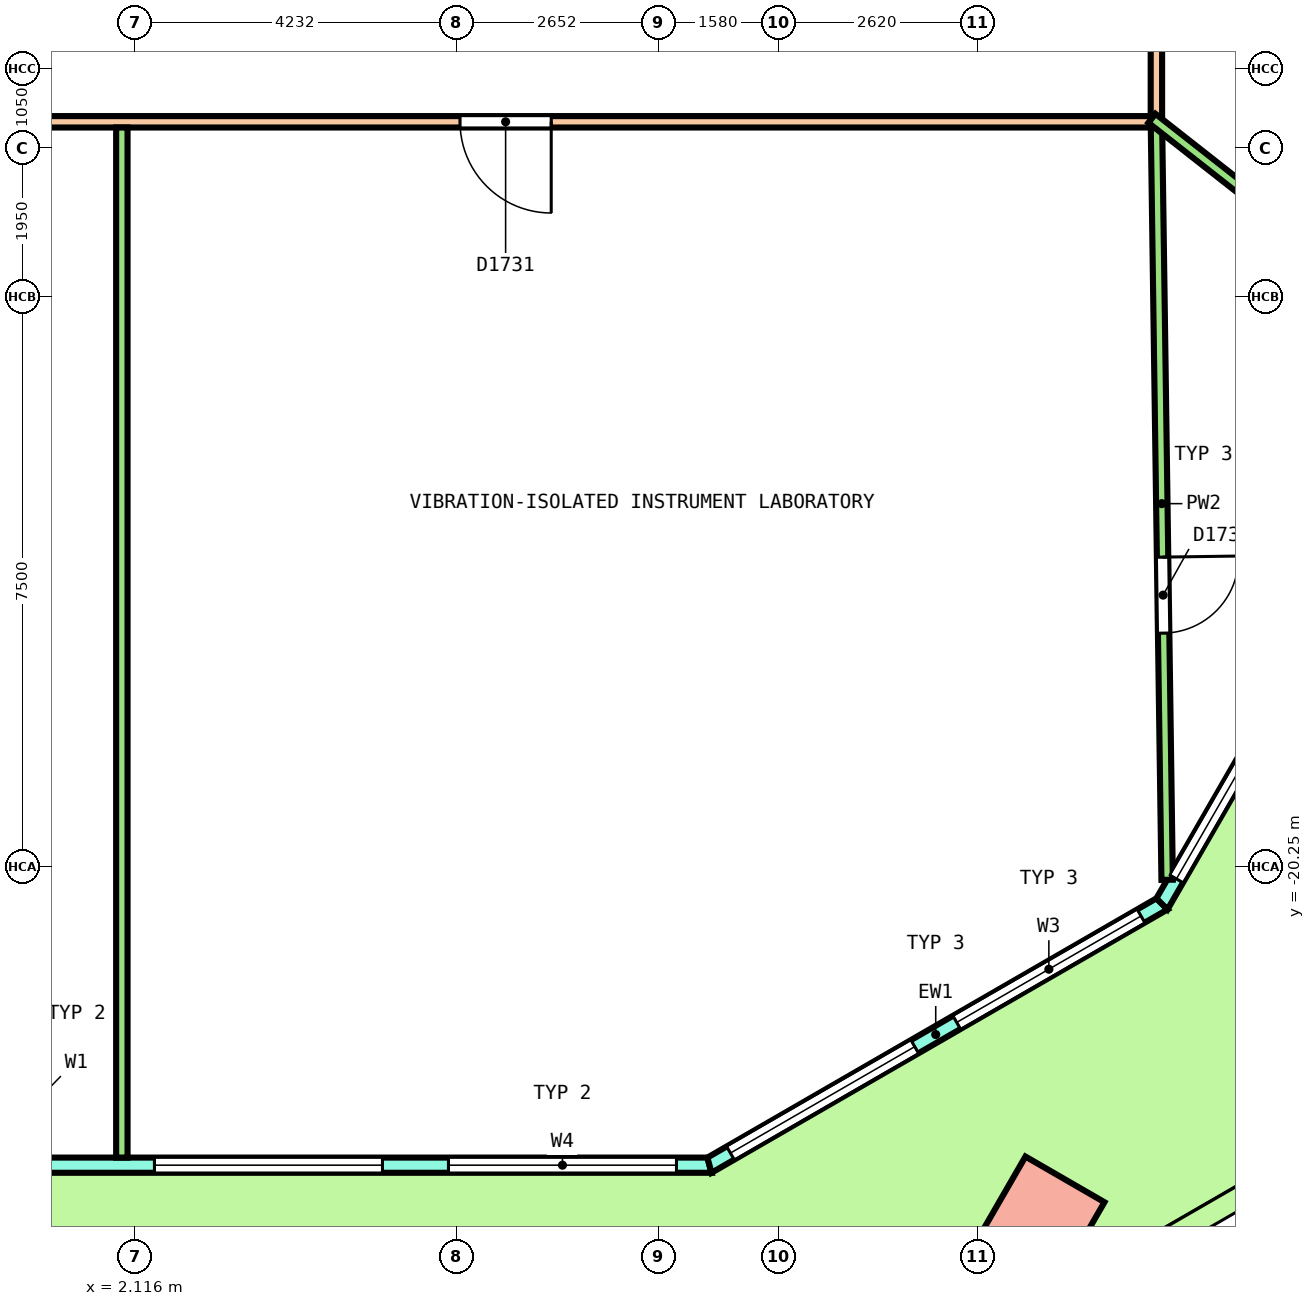
"""IFC4 building model, lengths in metres.
Left out: names, types, materials, properties, quantities, classifications, styles, units other than length and angle.
Written with IfcOpenShell. Run it as: python <this file> out.ifc"""

import sys

from ifc_helpers import new_model, si_unit, direction, frame, frame_2d, origin, origin_2d, place, context, subcontext, project, spatial, polyline, rectangle, outline, extrude, element, fill, save


model = new_model("IFC4")
c1 = context("Model", 3, precision=1e-05, world=origin(), true_north=direction((0.0, 1.0)))
c2 = subcontext(c1, "Body", "Model", "MODEL_VIEW")
j1 = project(units=[si_unit("LENGTHUNIT", "METRE"), si_unit("PLANEANGLEUNIT", "RADIAN")], contexts=[c1])
p1 = place(None, origin())
s1 = spatial("IfcSite", under=j1, at=p1, CompositionType="ELEMENT")
p2 = place(p1, origin())
s2 = spatial("IfcBuilding", under=s1, at=p2, CompositionType="ELEMENT")
p3 = place(p2, frame((0.0, 0.0, 154.0)))
s3 = spatial("IfcBuildingStorey", under=s2, at=p3, CompositionType="ELEMENT", Elevation=154.0)
p4 = place(p3, frame((14.047, -24.883, 0.0), z_axis=(-0.018132630042, -0.031385715123, 0.999342856388), x_axis=(0.865999247617, 0.499059286831, 0.031386802217)))
e1 = element("IfcColumn", 1, at=p4, inside=s3, PredefinedType="COLUMN", context=c2, shape_type="SweptSolid", body=[
    extrude(rectangle(XDim=1.2, YDim=1.2, at=origin_2d()), origin(), (0.0, 0.0, 1.0), 4.053),
])
p5 = place(p3, frame((-9.67, -24.177, 0.0), z_axis=(0.0, 0.0, 1.0), x_axis=(1.0, 0.0, 0.0)))
e2 = element("IfcWall", 2, at=p5, inside=s3, PredefinedType="SOLIDWALL", context=c2, shape_type="SweptSolid", body=[
    extrude(outline(polyline([(-0.027, -0.1), (0.994, -0.1), (2.015, -0.1), (3.035, -0.1), (4.056, -0.1), (5.077, -0.1), (6.097, -0.1), (7.118, -0.1), (8.139, -0.1), (9.16, -0.1), (10.18, -0.1), (11.201, -0.1), (12.222, -0.1), (13.242, -0.1), (14.263, -0.1), (15.284, -0.1), (16.304, -0.1), (17.325, -0.1), (18.346, -0.1), (19.367, -0.1), (19.313, 0.1), (18.298, 0.1), (17.283, 0.1), (16.268, 0.1), (15.253, 0.1), (14.238, 0.1), (13.223, 0.1), (12.208, 0.1), (11.193, 0.1), (10.177, 0.1), (9.162, 0.1), (8.147, 0.1), (7.132, 0.1), (6.117, 0.1), (5.102, 0.1), (4.087, 0.1), (3.072, 0.1), (2.057, 0.1), (1.042, 0.1), (0.027, 0.1), (-0.027, -0.1)])), origin(), (0.0, 0.0, 1.0), 4.1),
])
p6 = place(p5, frame((0.434, 0.0, 0.1)))
e3 = element("IfcOpeningElement", 3, at=p6, cuts=e2, PredefinedType="OPENING", context=c2, shape_type="SweptSolid", body=[
    extrude(rectangle(XDim=3.0, YDim=2.9, at=frame_2d((1.5, 1.45))), frame((0.0, 0.11, 0.0), z_axis=(0.0, -1.0, 0.0), x_axis=(1.0, 0.0, 0.0)), (0.0, 0.0, 1.0), 0.22),
])
p7 = place(p5, frame((4.302, 0.0, 0.1)))
e4 = element("IfcOpeningElement", 4, at=p7, cuts=e2, PredefinedType="OPENING", context=c2, shape_type="SweptSolid", body=[
    extrude(rectangle(XDim=3.0, YDim=2.9, at=frame_2d((1.5, 1.45))), frame((0.0, 0.11, 0.0), z_axis=(0.0, -1.0, 0.0), x_axis=(1.0, 0.0, 0.0)), (0.0, 0.0, 1.0), 0.22),
])
p8 = place(p5, frame((8.77, 0.0, 0.0)))
e5 = element("IfcOpeningElement", 5, at=p8, cuts=e2, PredefinedType="OPENING", context=c2, shape_type="SweptSolid", body=[
    extrude(rectangle(XDim=1.8, YDim=2.4, at=frame_2d((0.9, 1.2))), frame((0.0, 0.11, 0.0), z_axis=(0.0, -1.0, 0.0), x_axis=(1.0, 0.0, 0.0)), (0.0, 0.0, 1.0), 0.22),
])
p9 = place(p5, frame((8.77, 0.0, 2.55)))
e6 = element("IfcOpeningElement", 6, at=p9, cuts=e2, PredefinedType="OPENING", context=c2, shape_type="SweptSolid", body=[
    extrude(rectangle(XDim=1.8, YDim=0.45, at=frame_2d((0.9, 0.225))), frame((0.0, 0.11, 0.0), z_axis=(0.0, -1.0, 0.0), x_axis=(1.0, 0.0, 0.0)), (0.0, 0.0, 1.0), 0.22),
])
p10 = place(p5, frame((12.038, 0.0, 0.1)))
e7 = element("IfcOpeningElement", 7, at=p10, cuts=e2, PredefinedType="OPENING", context=c2, shape_type="SweptSolid", body=[
    extrude(rectangle(XDim=3.0, YDim=2.9, at=frame_2d((1.5, 1.45))), frame((0.0, 0.11, 0.0), z_axis=(0.0, -1.0, 0.0), x_axis=(1.0, 0.0, 0.0)), (0.0, 0.0, 1.0), 0.22),
])
p11 = place(p5, frame((15.906, 0.0, 0.1)))
e8 = element("IfcOpeningElement", 8, at=p11, cuts=e2, PredefinedType="OPENING", context=c2, shape_type="SweptSolid", body=[
    extrude(rectangle(XDim=3.0, YDim=2.9, at=frame_2d((1.5, 1.45))), frame((0.0, 0.11, 0.0), z_axis=(0.0, -1.0, 0.0), x_axis=(1.0, 0.0, 0.0)), (0.0, 0.0, 1.0), 0.22),
])
p12 = place(p3, frame((9.67, -24.177, 0.0), z_axis=(0.0, 0.0, 1.0), x_axis=(0.866029458321, 0.49999297727, 0.0)))
e9 = element("IfcWall", 9, at=p12, inside=s3, PredefinedType="SOLIDWALL", context=c2, shape_type="SweptSolid", body=[
    extrude(outline(polyline([(-0.027, -0.1), (1.128, -0.1), (2.282, -0.1), (3.437, -0.1), (4.592, -0.1), (5.747, -0.1), (6.901, -0.1), (6.848, 0.1), (5.711, 0.1), (4.574, 0.1), (3.437, 0.1), (2.301, 0.1), (1.164, 0.1), (0.027, 0.1), (-0.027, -0.1)])), origin(), (0.0, 0.0, 1.0), 4.1),
])
p13 = place(p12, frame((0.319, 0.0, 0.1)))
e10 = element("IfcOpeningElement", 10, at=p13, cuts=e9, PredefinedType="OPENING", context=c2, shape_type="SweptSolid", body=[
    extrude(rectangle(XDim=2.8, YDim=2.9, at=frame_2d((1.4, 1.45))), frame((0.0, 0.11, 0.0), z_axis=(0.0, -1.0, 0.0), x_axis=(1.0, 0.0, 0.0)), (0.0, 0.0, 1.0), 0.22),
])
p14 = place(p12, frame((3.756, 0.0, 0.1)))
e11 = element("IfcOpeningElement", 11, at=p14, cuts=e9, PredefinedType="OPENING", context=c2, shape_type="SweptSolid", body=[
    extrude(rectangle(XDim=2.8, YDim=2.9, at=frame_2d((1.4, 1.45))), frame((0.0, 0.11, 0.0), z_axis=(0.0, -1.0, 0.0), x_axis=(1.0, 0.0, 0.0)), (0.0, 0.0, 1.0), 0.22),
])
p15 = place(p3, frame((15.624, -20.739, 0.0), z_axis=(0.0, 0.0, 1.0), x_axis=(0.500001833672, 0.866024345111, 0.0)))
e12 = element("IfcWall", 12, at=p15, inside=s3, PredefinedType="SOLIDWALL", context=c2, shape_type="SweptSolid", body=[
    extrude(outline(polyline([(-0.027, -0.1), (0.991, -0.1), (2.008, -0.1), (3.026, -0.1), (4.043, -0.1), (5.061, -0.1), (6.079, -0.1), (7.096, -0.1), (8.114, -0.1), (9.131, -0.1), (10.149, -0.1), (11.167, -0.1), (12.184, -0.1), (13.202, -0.1), (14.219, -0.1), (15.237, -0.1), (16.254, -0.1), (17.272, -0.1), (18.29, -0.1), (19.307, -0.1), (20.325, -0.1), (20.271, 0.1), (19.259, 0.1), (18.247, 0.1), (17.234, 0.1), (16.222, 0.1), (15.21, 0.1), (14.198, 0.1), (13.186, 0.1), (12.173, 0.1), (11.161, 0.1), (10.149, 0.1), (9.137, 0.1), (8.125, 0.1), (7.112, 0.1), (6.1, 0.1), (5.088, 0.1), (4.076, 0.1), (3.063, 0.1), (2.051, 0.1), (1.039, 0.1), (0.027, 0.1), (-0.027, -0.1)])), origin(), (0.0, 0.0, 1.0), 4.1),
])
p16 = place(p15, frame((0.38, 0.0, 0.1)))
e13 = element("IfcOpeningElement", 13, at=p16, cuts=e12, PredefinedType="OPENING", context=c2, shape_type="SweptSolid", body=[
    extrude(rectangle(XDim=3.3, YDim=2.9, at=frame_2d((1.65, 1.45))), frame((0.0, 0.11, 0.0), z_axis=(0.0, -1.0, 0.0), x_axis=(1.0, 0.0, 0.0)), (0.0, 0.0, 1.0), 0.22),
])
p17 = place(p15, frame((4.439, 0.0, 0.1)))
e14 = element("IfcOpeningElement", 14, at=p17, cuts=e12, PredefinedType="OPENING", context=c2, shape_type="SweptSolid", body=[
    extrude(rectangle(XDim=3.3, YDim=2.9, at=frame_2d((1.65, 1.45))), frame((0.0, 0.11, 0.0), z_axis=(0.0, -1.0, 0.0), x_axis=(1.0, 0.0, 0.0)), (0.0, 0.0, 1.0), 0.22),
])
p18 = place(p15, frame((9.249, 0.0, 0.0)))
e15 = element("IfcOpeningElement", 15, at=p18, cuts=e12, PredefinedType="OPENING", context=c2, shape_type="SweptSolid", body=[
    extrude(rectangle(XDim=1.8, YDim=2.4, at=frame_2d((0.9, 1.2))), frame((0.0, 0.11, 0.0), z_axis=(0.0, -1.0, 0.0), x_axis=(1.0, 0.0, 0.0)), (0.0, 0.0, 1.0), 0.22),
])
p19 = place(p15, frame((9.249, 0.0, 2.55)))
e16 = element("IfcOpeningElement", 16, at=p19, cuts=e12, PredefinedType="OPENING", context=c2, shape_type="SweptSolid", body=[
    extrude(rectangle(XDim=1.8, YDim=0.45, at=frame_2d((0.9, 0.225))), frame((0.0, 0.11, 0.0), z_axis=(0.0, -1.0, 0.0), x_axis=(1.0, 0.0, 0.0)), (0.0, 0.0, 1.0), 0.22),
])
p20 = place(p15, frame((12.559, 0.0, 0.1)))
e17 = element("IfcOpeningElement", 17, at=p20, cuts=e12, PredefinedType="OPENING", context=c2, shape_type="SweptSolid", body=[
    extrude(rectangle(XDim=3.3, YDim=2.9, at=frame_2d((1.65, 1.45))), frame((0.0, 0.11, 0.0), z_axis=(0.0, -1.0, 0.0), x_axis=(1.0, 0.0, 0.0)), (0.0, 0.0, 1.0), 0.22),
])
p21 = place(p15, frame((16.618, 0.0, 0.1)))
e18 = element("IfcOpeningElement", 18, at=p21, cuts=e12, PredefinedType="OPENING", context=c2, shape_type="SweptSolid", body=[
    extrude(rectangle(XDim=3.3, YDim=2.9, at=frame_2d((1.65, 1.45))), frame((0.0, 0.11, 0.0), z_axis=(0.0, -1.0, 0.0), x_axis=(1.0, 0.0, 0.0)), (0.0, 0.0, 1.0), 0.22),
])
p22 = place(p3, frame((15.55, -10.375, 0.0), z_axis=(0.0, 0.0, 1.0), x_axis=(0.0, 1.0, 0.0)))
e19 = element("IfcWall", 19, at=p22, inside=s3, PredefinedType="PARTITIONING", context=c2, shape_type="SweptSolid", body=[
    extrude(rectangle(XDim=7.994, YDim=0.15, at=frame_2d((3.997, 0.0))), origin(), (0.0, 0.0, 1.0), 3.05),
])
p23 = place(p3, frame((-15.475, -10.45, 0.0), z_axis=(0.0, 0.0, 1.0), x_axis=(1.0, 0.0, 0.0)))
e20 = element("IfcWall", 20, at=p23, inside=s3, PredefinedType="PARTITIONING", context=c2, shape_type="SweptSolid", body=[
    extrude(rectangle(XDim=30.95, YDim=0.15, at=frame_2d((15.475, 0.0))), origin(), (0.0, 0.0, 1.0), 3.05),
])
p24 = place(p23, frame((10.408, 0.0, 0.0)))
e21 = element("IfcOpeningElement", 21, at=p24, cuts=e20, PredefinedType="OPENING", context=c2, shape_type="SweptSolid", body=[
    extrude(rectangle(XDim=1.2, YDim=2.1, at=frame_2d((0.6, 1.05))), frame((0.0, 0.085, 0.0), z_axis=(0.0, -1.0, 0.0), x_axis=(1.0, 0.0, 0.0)), (0.0, 0.0, 1.0), 0.17),
])
p25 = place(p23, frame((21.863, 0.0, 0.0)))
e22 = element("IfcOpeningElement", 22, at=p25, cuts=e20, PredefinedType="OPENING", context=c2, shape_type="SweptSolid", body=[
    extrude(rectangle(XDim=1.2, YDim=2.1, at=frame_2d((0.6, 1.05))), frame((0.0, 0.085, 0.0), z_axis=(0.0, -1.0, 0.0), x_axis=(1.0, 0.0, 0.0)), (0.0, 0.0, 1.0), 0.17),
])
p26 = place(p3, frame((1.939, -24.077, 0.0), z_axis=(0.0, 0.0, 1.0), x_axis=(0.0, 1.0, 0.0)))
e23 = element("IfcWall", 23, at=p26, inside=s3, PredefinedType="PARTITIONING", context=c2, shape_type="SweptSolid", body=[
    extrude(rectangle(XDim=13.552, YDim=0.15, at=frame_2d((6.776, 0.0))), origin(), (0.0, 0.0, 1.0), 3.05),
])
p27 = place(p3, frame((15.551, -10.525, 0.0), z_axis=(0.0, 0.0, 1.0), x_axis=(0.014157785589, -0.999899773531, 0.0)))
e24 = element("IfcWall", 24, at=p27, inside=s3, PredefinedType="PARTITIONING", context=c2, shape_type="SweptSolid", body=[
    extrude(rectangle(XDim=9.898, YDim=0.15, at=frame_2d((4.949, 0.0))), origin(), (0.0, 0.0, 1.0), 3.05),
])
p28 = place(p27, frame((5.653, 0.0, 0.0)))
e25 = element("IfcOpeningElement", 25, at=p28, cuts=e24, PredefinedType="OPENING", context=c2, shape_type="SweptSolid", body=[
    extrude(rectangle(XDim=1.0, YDim=2.1, at=frame_2d((0.5, 1.05))), frame((0.0, 0.085, 0.0), z_axis=(0.0, -1.0, 0.0), x_axis=(1.0, 0.0, 0.0)), (0.0, 0.0, 1.0), 0.17),
])
p29 = place(p3, frame((15.491, -10.404, 0.0), z_axis=(0.0, 0.0, 1.0), x_axis=(0.78641541947, -0.617697974757, 0.0)))
e26 = element("IfcWall", 26, at=p29, inside=s3, PredefinedType="PARTITIONING", context=c2, shape_type="SweptSolid", body=[
    extrude(rectangle(XDim=5.235, YDim=0.15, at=frame_2d((2.618, 0.0))), origin(), (0.0, 0.0, 1.0), 3.05),
])
p30 = place(p10, origin())
e27 = element("IfcWindow", 27, at=p30, inside=s3, PartitioningType="SINGLE_PANEL", PredefinedType="WINDOW", context=c2, shape_type="SweptSolid", body=[
    extrude(rectangle(XDim=3.0, YDim=2.9, at=frame_2d((1.5, 1.45))), frame((0.0, 0.03, 0.0), z_axis=(0.0, -1.0, 0.0), x_axis=(1.0, 0.0, 0.0)), (0.0, 0.0, 1.0), 0.06),
])
fill(e7, e27)
p31 = place(p11, origin())
e28 = element("IfcWindow", 28, at=p31, inside=s3, PartitioningType="SINGLE_PANEL", PredefinedType="WINDOW", context=c2, shape_type="SweptSolid", body=[
    extrude(rectangle(XDim=3.0, YDim=2.9, at=frame_2d((1.5, 1.45))), frame((0.0, 0.03, 0.0), z_axis=(0.0, -1.0, 0.0), x_axis=(1.0, 0.0, 0.0)), (0.0, 0.0, 1.0), 0.06),
])
fill(e8, e28)
p32 = place(p13, origin())
e29 = element("IfcWindow", 29, at=p32, inside=s3, PartitioningType="SINGLE_PANEL", PredefinedType="WINDOW", context=c2, shape_type="SweptSolid", body=[
    extrude(rectangle(XDim=2.8, YDim=2.9, at=frame_2d((1.4, 1.45))), frame((0.0, 0.03, 0.0), z_axis=(0.0, -1.0, 0.0), x_axis=(1.0, 0.0, 0.0)), (0.0, 0.0, 1.0), 0.06),
])
fill(e10, e29)
p33 = place(p14, origin())
e30 = element("IfcWindow", 30, at=p33, inside=s3, PartitioningType="SINGLE_PANEL", PredefinedType="WINDOW", context=c2, shape_type="SweptSolid", body=[
    extrude(rectangle(XDim=2.8, YDim=2.9, at=frame_2d((1.4, 1.45))), frame((0.0, 0.03, 0.0), z_axis=(0.0, -1.0, 0.0), x_axis=(1.0, 0.0, 0.0)), (0.0, 0.0, 1.0), 0.06),
])
fill(e11, e30)
p34 = place(p16, origin())
e31 = element("IfcWindow", 31, at=p34, inside=s3, PartitioningType="SINGLE_PANEL", PredefinedType="WINDOW", context=c2, shape_type="SweptSolid", body=[
    extrude(rectangle(XDim=3.3, YDim=2.9, at=frame_2d((1.65, 1.45))), frame((0.0, 0.03, 0.0), z_axis=(0.0, -1.0, 0.0), x_axis=(1.0, 0.0, 0.0)), (0.0, 0.0, 1.0), 0.06),
])
fill(e13, e31)
p35 = place(p25, origin())
e32 = element("IfcDoor", 32, at=p35, inside=s3, OperationType="DOUBLE_DOOR_SINGLE_SWING", PredefinedType="DOOR", context=c2, shape_type="SweptSolid", body=[
    extrude(rectangle(XDim=1.2, YDim=2.1, at=frame_2d((0.6, 1.05))), frame((0.0, 0.025, 0.0), z_axis=(0.0, -1.0, 0.0), x_axis=(1.0, 0.0, 0.0)), (0.0, 0.0, 1.0), 0.05),
])
fill(e22, e32)
p36 = place(p28, origin())
e33 = element("IfcDoor", 33, at=p36, inside=s3, OperationType="SINGLE_SWING_RIGHT", PredefinedType="DOOR", context=c2, shape_type="SweptSolid", body=[
    extrude(rectangle(XDim=1.0, YDim=2.1, at=frame_2d((0.5, 1.05))), frame((0.0, 0.025, 0.0), z_axis=(0.0, -1.0, 0.0), x_axis=(1.0, 0.0, 0.0)), (0.0, 0.0, 1.0), 0.05),
])
fill(e25, e33)
save(model, sys.argv[1])
